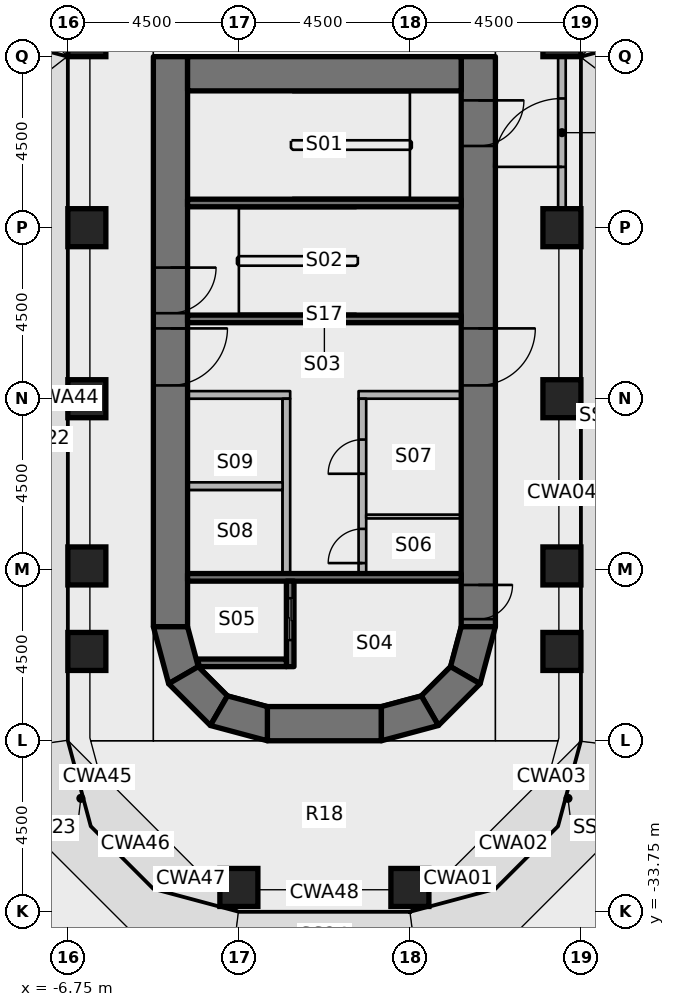
"""IFC4 building model, lengths in metres.
Left out: names, types, materials, properties, quantities, classifications, styles, units other than length and angle.
Written with IfcOpenShell. Run it as: python <this file> out.ifc"""

import sys

from ifc_helpers import new_model, si_unit, direction, frame, frame_2d, origin, origin_2d, place, context, subcontext, project, spatial, polyline, rectangle, outline, extrude, element, fill, save


model = new_model("IFC4")
c1 = context("Model", 3, precision=1e-05, world=origin(), true_north=direction((0.0, 1.0)))
c2 = subcontext(c1, "Body", "Model", "MODEL_VIEW")
j1 = project(units=[si_unit("LENGTHUNIT", "METRE"), si_unit("PLANEANGLEUNIT", "RADIAN")], contexts=[c1])
p1 = place(None, origin())
s1 = spatial("IfcSite", under=j1, at=p1, CompositionType="ELEMENT")
p2 = place(p1, origin())
s2 = spatial("IfcBuilding", under=s1, at=p2, CompositionType="ELEMENT")
p3 = place(p2, frame((0.0, 0.0, 27.0)))
s3 = spatial("IfcBuildingStorey", under=s2, at=p3, CompositionType="ELEMENT", Elevation=27.0)
for number, where, z_axis, x_axis in (
    (1, (-6.25, -26.9, 0.0), (0.0, 0.0, 1.0), (1.0, 0.0, 0.0)),
    (2, (-6.25, -24.65, 0.0), (0.0, 0.0, 1.0), (1.0, 0.0, 0.0)),
    (3, (-6.25, -20.25, 0.0), (0.0, 0.0, 1.0), (1.0, 0.0, 0.0)),
    (4, (-6.25, -15.75, 0.0), (0.0, 0.0, 1.0), (1.0, 0.0, 0.0)),
    (5, (-6.25, -10.75, 0.0), (0.0, 0.0, 1.0), (1.0, 0.0, 0.0)),
    (6, (-2.25, -33.11, 0.0), (0.0, 0.0, 1.0), (1.0, 0.0, 0.0)),
    (7, (2.25, -33.11, 0.0), (0.0, 0.0, 1.0), (1.0, 0.0, 0.0)),
    (8, (6.25, -26.9, 0.0), (0.0, 0.0, 1.0), (1.0, 0.0, 0.0)),
    (9, (6.25, -24.65, 0.0), (0.0, 0.0, 1.0), (1.0, 0.0, 0.0)),
    (10, (6.25, -20.25, 0.0), (0.0, 0.0, 1.0), (1.0, 0.0, 0.0)),
    (11, (6.25, -15.75, 0.0), (0.0, 0.0, 1.0), (1.0, 0.0, 0.0)),
    (12, (6.25, -10.75, 0.0), (0.0, 0.0, 1.0), (1.0, 0.0, 0.0)),
):
    element("IfcColumn", number, at=place(p3, frame(where, z_axis=z_axis, x_axis=x_axis)), inside=s3, PredefinedType="COLUMN", context=c2, shape_type="SweptSolid", body=[
        extrude(rectangle(XDim=1.0, YDim=1.0, at=origin_2d()), origin(), (0.0, 0.0, 1.0), 4.05),
    ])
p4 = place(p3, frame((-4.05, -11.25, 0.0), z_axis=(0.0, 0.0, 1.0), x_axis=(0.0, -1.0, 0.0)))
e13 = element("IfcWall", 13, at=p4, inside=s3, PredefinedType="SHEAR", context=c2, shape_type="SweptSolid", body=[
    extrude(rectangle(XDim=15.0, YDim=0.9, at=frame_2d((7.5, 0.0))), origin(), (0.0, 0.0, 1.0), 4.2),
])
p5 = place(p4, frame((7.15, 0.0, 0.0)))
e14 = element("IfcOpeningElement", 14, at=p5, cuts=e13, PredefinedType="OPENING", context=c2, shape_type="SweptSolid", body=[
    extrude(rectangle(XDim=1.5, YDim=2.3, at=frame_2d((0.75, 1.15))), frame((0.0, 0.46, 0.0), z_axis=(0.0, -1.0, 0.0), x_axis=(1.0, 0.0, 0.0)), (0.0, 0.0, 1.0), 0.92),
])
p6 = place(p4, frame((5.55, 0.0, 0.0)))
e15 = element("IfcOpeningElement", 15, at=p6, cuts=e13, PredefinedType="OPENING", context=c2, shape_type="SweptSolid", body=[
    extrude(rectangle(XDim=1.2, YDim=2.1, at=frame_2d((0.6, 1.05))), frame((0.0, 0.46, 0.0), z_axis=(0.0, -1.0, 0.0), x_axis=(1.0, 0.0, 0.0)), (0.0, 0.0, 1.0), 0.92),
])
p7 = place(p3, frame((4.05, -11.25, 0.0), z_axis=(0.0, 0.0, 1.0), x_axis=(0.0, -1.0, 0.0)))
e16 = element("IfcWall", 16, at=p7, inside=s3, PredefinedType="SHEAR", context=c2, shape_type="SweptSolid", body=[
    extrude(rectangle(XDim=15.0, YDim=0.9, at=frame_2d((7.5, 0.0))), origin(), (0.0, 0.0, 1.0), 4.2),
])
p8 = place(p7, frame((7.15, 0.0, 0.0)))
e17 = element("IfcOpeningElement", 17, at=p8, cuts=e16, PredefinedType="OPENING", context=c2, shape_type="SweptSolid", body=[
    extrude(rectangle(XDim=1.5, YDim=2.3, at=frame_2d((0.75, 1.15))), frame((0.0, 0.46, 0.0), z_axis=(0.0, -1.0, 0.0), x_axis=(1.0, 0.0, 0.0)), (0.0, 0.0, 1.0), 0.92),
])
p9 = place(p7, frame((13.9, 0.0, 0.0)))
e18 = element("IfcOpeningElement", 18, at=p9, cuts=e16, PredefinedType="OPENING", context=c2, shape_type="SweptSolid", body=[
    extrude(rectangle(XDim=0.9, YDim=2.1, at=frame_2d((0.45, 1.05))), frame((0.0, 0.46, 0.0), z_axis=(0.0, -1.0, 0.0), x_axis=(1.0, 0.0, 0.0)), (0.0, 0.0, 1.0), 0.92),
])
p10 = place(p7, frame((1.15, 0.0, 0.0)))
e19 = element("IfcOpeningElement", 19, at=p10, cuts=e16, PredefinedType="OPENING", context=c2, shape_type="SweptSolid", body=[
    extrude(rectangle(XDim=1.2, YDim=2.1, at=frame_2d((0.6, 1.05))), frame((0.0, 0.46, 0.0), z_axis=(0.0, -1.0, 0.0), x_axis=(1.0, 0.0, 0.0)), (0.0, 0.0, 1.0), 0.92),
])
p11 = place(p3, frame((-3.6, -11.7, 0.0), z_axis=(0.0, 0.0, 1.0), x_axis=(1.0, 0.0, 0.0)))
e20 = element("IfcWall", 20, at=p11, inside=s3, PredefinedType="SHEAR", context=c2, shape_type="SweptSolid", body=[
    extrude(rectangle(XDim=7.2, YDim=0.9, at=frame_2d((3.6, 0.0))), origin(), (0.0, 0.0, 1.0), 4.2),
])
p12 = place(p3, frame((-1.5, -28.8, 0.0), z_axis=(0.0, 0.0, 1.0), x_axis=(1.0, 0.0, 0.0)))
e21 = element("IfcWall", 21, at=p12, inside=s3, PredefinedType="SHEAR", context=c2, shape_type="SweptSolid", body=[
    extrude(rectangle(XDim=3.0, YDim=0.9, at=frame_2d((1.5, 0.0))), origin(), (0.0, 0.0, 1.0), 4.2),
])
p13 = place(p3, origin())
e22 = element("IfcWall", 22, at=p13, inside=s3, PredefinedType="SHEAR", context=c2, shape_type="SweptSolid", body=[
    extrude(outline(polyline([(-4.5, -26.25), (-4.098, -27.75), (-3.319, -27.3), (-3.6, -26.25), (-4.5, -26.25)])), origin(), (0.0, 0.0, 1.0), 4.2),
])
p14 = place(p3, origin())
e23 = element("IfcWall", 23, at=p14, inside=s3, PredefinedType="SHEAR", context=c2, shape_type="SweptSolid", body=[
    extrude(outline(polyline([(-4.098, -27.75), (-3.0, -28.848), (-2.55, -28.069), (-3.319, -27.3), (-4.098, -27.75)])), origin(), (0.0, 0.0, 1.0), 4.2),
])
p15 = place(p3, origin())
e24 = element("IfcWall", 24, at=p15, inside=s3, PredefinedType="SHEAR", context=c2, shape_type="SweptSolid", body=[
    extrude(outline(polyline([(-3.0, -28.848), (-1.5, -29.25), (-1.5, -28.35), (-2.55, -28.069), (-3.0, -28.848)])), origin(), (0.0, 0.0, 1.0), 4.2),
])
p16 = place(p3, origin())
e25 = element("IfcWall", 25, at=p16, inside=s3, PredefinedType="SHEAR", context=c2, shape_type="SweptSolid", body=[
    extrude(outline(polyline([(4.5, -26.25), (4.098, -27.75), (3.319, -27.3), (3.6, -26.25), (4.5, -26.25)])), origin(), (0.0, 0.0, 1.0), 4.2),
])
p17 = place(p3, origin())
e26 = element("IfcWall", 26, at=p17, inside=s3, PredefinedType="SHEAR", context=c2, shape_type="SweptSolid", body=[
    extrude(outline(polyline([(4.098, -27.75), (3.0, -28.848), (2.55, -28.069), (3.319, -27.3), (4.098, -27.75)])), origin(), (0.0, 0.0, 1.0), 4.2),
])
p18 = place(p3, origin())
e27 = element("IfcWall", 27, at=p18, inside=s3, PredefinedType="SHEAR", context=c2, shape_type="SweptSolid", body=[
    extrude(outline(polyline([(3.0, -28.848), (1.5, -29.25), (1.5, -28.35), (2.55, -28.069), (3.0, -28.848)])), origin(), (0.0, 0.0, 1.0), 4.2),
])
p19 = place(p3, frame((6.25, -15.25, 0.0), z_axis=(0.0, 0.0, 1.0), x_axis=(0.0, 1.0, 0.0)))
e28 = element("IfcWall", 28, at=p19, inside=s3, PredefinedType="SOLIDWALL", context=c2, shape_type="SweptSolid", body=[
    extrude(rectangle(XDim=4.0, YDim=0.2, at=frame_2d((2.0, 0.0))), origin(), (0.0, 0.0, 1.0), 3.15),
])
p20 = place(p19, frame((1.1, 0.0, 0.0)))
e29 = element("IfcOpeningElement", 29, at=p20, cuts=e28, PredefinedType="OPENING", context=c2, shape_type="SweptSolid", body=[
    extrude(rectangle(XDim=1.8, YDim=2.4, at=frame_2d((0.9, 1.2))), frame((0.0, 0.11, 0.0), z_axis=(0.0, -1.0, 0.0), x_axis=(1.0, 0.0, 0.0)), (0.0, 0.0, 1.0), 0.22),
])
p21 = place(p3, frame((3.6, -24.95, 0.0), z_axis=(0.0, 0.0, 1.0), x_axis=(-1.0, 0.0, 0.0)))
e30 = element("IfcWall", 30, at=p21, inside=s3, PredefinedType="SHEAR", context=c2, shape_type="SweptSolid", body=[
    extrude(rectangle(XDim=7.2, YDim=0.2, at=frame_2d((3.6, 0.0))), origin(), (0.0, 0.0, 1.0), 4.05),
])
p22 = place(p3, frame((-0.9, -27.3, 0.0), z_axis=(0.0, 0.0, 1.0), x_axis=(0.0, 1.0, 0.0)))
e31 = element("IfcWall", 31, at=p22, inside=s3, PredefinedType="SHEAR", context=c2, shape_type="SweptSolid", body=[
    extrude(rectangle(XDim=2.25, YDim=0.2, at=frame_2d((1.125, 0.0))), origin(), (0.0, 0.0, 1.0), 4.05),
])
p23 = place(p22, frame((0.7, 0.0, 0.0)))
e32 = element("IfcOpeningElement", 32, at=p23, cuts=e31, PredefinedType="OPENING", context=c2, shape_type="SweptSolid", body=[
    extrude(rectangle(XDim=1.1, YDim=2.3, at=frame_2d((0.55, 1.15))), frame((0.0, 0.11, 0.0), z_axis=(0.0, -1.0, 0.0), x_axis=(1.0, 0.0, 0.0)), (0.0, 0.0, 1.0), 0.22),
])
p24 = place(p3, origin())
e33 = element("IfcWall", 33, at=p24, inside=s3, PredefinedType="SHEAR", context=c2, shape_type="SweptSolid", body=[
    extrude(outline(polyline([(-1.0, -27.1), (-3.341, -27.1), (-3.291, -27.284), (-3.275, -27.3), (-1.0, -27.3), (-1.0, -27.1)])), origin(), (0.0, 0.0, 1.0), 4.05),
])
for number, where, z_axis, x_axis in (
    (34, (3.6, -18.15, 0.0), (0.0, 0.0, 1.0), (-1.0, 0.0, 0.0)),
    (35, (3.6, -15.1, 0.0), (0.0, 0.0, 1.0), (-1.0, 0.0, 0.0)),
):
    element("IfcWall", number, at=place(p3, frame(where, z_axis=z_axis, x_axis=x_axis)), inside=s3, PredefinedType="SHEAR", context=c2, shape_type="SweptSolid", body=[
        extrude(rectangle(XDim=7.2, YDim=0.2, at=frame_2d((3.6, 0.0))), origin(), (0.0, 0.0, 1.0), 4.05),
    ])
p25 = place(p3, frame((3.6, -20.15, 0.0), z_axis=(0.0, 0.0, 1.0), x_axis=(-1.0, 0.0, 0.0)))
e36 = element("IfcWall", 36, at=p25, inside=s3, PredefinedType="PARTITIONING", context=c2, shape_type="SweptSolid", body=[
    extrude(rectangle(XDim=2.7, YDim=0.2, at=frame_2d((1.35, 0.0))), origin(), (0.0, 0.0, 1.0), 4.05),
])
p26 = place(p3, frame((1.0, -24.85, 0.0), z_axis=(0.0, 0.0, 1.0), x_axis=(0.0, 1.0, 0.0)))
e37 = element("IfcWall", 37, at=p26, inside=s3, PredefinedType="PARTITIONING", context=c2, shape_type="SweptSolid", body=[
    extrude(rectangle(XDim=4.6, YDim=0.2, at=frame_2d((2.3, 0.0))), origin(), (0.0, 0.0, 1.0), 4.05),
])
p27 = place(p26, frame((0.275, 0.0, 0.0)))
e38 = element("IfcOpeningElement", 38, at=p27, cuts=e37, PredefinedType="OPENING", context=c2, shape_type="SweptSolid", body=[
    extrude(rectangle(XDim=0.9, YDim=2.1, at=frame_2d((0.45, 1.05))), frame((0.0, 0.11, 0.0), z_axis=(0.0, -1.0, 0.0), x_axis=(1.0, 0.0, 0.0)), (0.0, 0.0, 1.0), 0.22),
])
p28 = place(p26, frame((2.625, 0.0, 0.0)))
e39 = element("IfcOpeningElement", 39, at=p28, cuts=e37, PredefinedType="OPENING", context=c2, shape_type="SweptSolid", body=[
    extrude(rectangle(XDim=0.9, YDim=2.1, at=frame_2d((0.45, 1.05))), frame((0.0, 0.11, 0.0), z_axis=(0.0, -1.0, 0.0), x_axis=(1.0, 0.0, 0.0)), (0.0, 0.0, 1.0), 0.22),
])
p29 = place(p3, frame((-0.9, -20.15, 0.0), z_axis=(0.0, 0.0, 1.0), x_axis=(-1.0, 0.0, 0.0)))
e40 = element("IfcWall", 40, at=p29, inside=s3, PredefinedType="PARTITIONING", context=c2, shape_type="SweptSolid", body=[
    extrude(rectangle(XDim=2.7, YDim=0.2, at=frame_2d((1.35, 0.0))), origin(), (0.0, 0.0, 1.0), 4.05),
])
p30 = place(p3, frame((-1.0, -24.85, 0.0), z_axis=(0.0, 0.0, 1.0), x_axis=(0.0, 1.0, 0.0)))
e41 = element("IfcWall", 41, at=p30, inside=s3, PredefinedType="PARTITIONING", context=c2, shape_type="SweptSolid", body=[
    extrude(rectangle(XDim=4.6, YDim=0.2, at=frame_2d((2.3, 0.0))), origin(), (0.0, 0.0, 1.0), 4.05),
])
p31 = place(p3, frame((3.6, -23.35, 0.0), z_axis=(0.0, 0.0, 1.0), x_axis=(-1.0, 0.0, 0.0)))
e42 = element("IfcWall", 42, at=p31, inside=s3, PredefinedType="PARTITIONING", context=c2, shape_type="SweptSolid", body=[
    extrude(rectangle(XDim=2.5, YDim=0.1, at=frame_2d((1.25, 0.0))), origin(), (0.0, 0.0, 1.0), 4.05),
])
p32 = place(p3, frame((-1.1, -22.55, 0.0), z_axis=(0.0, 0.0, 1.0), x_axis=(-1.0, 0.0, 0.0)))
e43 = element("IfcWall", 43, at=p32, inside=s3, PredefinedType="PARTITIONING", context=c2, shape_type="SweptSolid", body=[
    extrude(rectangle(XDim=2.5, YDim=0.2, at=frame_2d((1.25, 0.0))), origin(), (0.0, 0.0, 1.0), 4.05),
])
p33 = place(p20, origin())
e44 = element("IfcDoor", 44, at=p33, inside=s3, OperationType="SINGLE_SWING_LEFT", PredefinedType="DOOR", context=c2, shape_type="SweptSolid", body=[
    extrude(rectangle(XDim=1.8, YDim=2.4, at=frame_2d((0.9, 1.2))), frame((0.0, 0.025, 0.0), z_axis=(0.0, -1.0, 0.0), x_axis=(1.0, 0.0, 0.0)), (0.0, 0.0, 1.0), 0.05),
])
fill(e29, e44)
p34 = place(p8, origin())
e45 = element("IfcDoor", 45, at=p34, inside=s3, OperationType="DOUBLE_DOOR_SINGLE_SWING", PredefinedType="DOOR", context=c2, shape_type="SweptSolid", body=[
    extrude(rectangle(XDim=1.5, YDim=2.3, at=frame_2d((0.75, 1.15))), frame((0.0, 0.025, 0.0), z_axis=(0.0, -1.0, 0.0), x_axis=(1.0, 0.0, 0.0)), (0.0, 0.0, 1.0), 0.05),
])
fill(e17, e45)
p35 = place(p5, origin())
e46 = element("IfcDoor", 46, at=p35, inside=s3, OperationType="DOUBLE_DOOR_SINGLE_SWING", PredefinedType="DOOR", context=c2, shape_type="SweptSolid", body=[
    extrude(rectangle(XDim=1.5, YDim=2.3, at=frame_2d((0.75, 1.15))), frame((0.0, 0.025, 0.0), z_axis=(0.0, -1.0, 0.0), x_axis=(1.0, 0.0, 0.0)), (0.0, 0.0, 1.0), 0.05),
])
fill(e14, e46)
p36 = place(p9, origin())
e47 = element("IfcDoor", 47, at=p36, inside=s3, OperationType="SINGLE_SWING_LEFT", PredefinedType="DOOR", context=c2, shape_type="SweptSolid", body=[
    extrude(rectangle(XDim=0.9, YDim=2.1, at=frame_2d((0.45, 1.05))), frame((0.0, 0.025, 0.0), z_axis=(0.0, -1.0, 0.0), x_axis=(1.0, 0.0, 0.0)), (0.0, 0.0, 1.0), 0.05),
])
fill(e18, e47)
p37 = place(p6, origin())
e48 = element("IfcDoor", 48, at=p37, inside=s3, OperationType="SINGLE_SWING_RIGHT", PredefinedType="DOOR", context=c2, shape_type="SweptSolid", body=[
    extrude(rectangle(XDim=1.2, YDim=2.1, at=frame_2d((0.6, 1.05))), frame((0.0, 0.025, 0.0), z_axis=(0.0, -1.0, 0.0), x_axis=(1.0, 0.0, 0.0)), (0.0, 0.0, 1.0), 0.05),
])
fill(e15, e48)
p38 = place(p10, origin())
e49 = element("IfcDoor", 49, at=p38, inside=s3, OperationType="SINGLE_SWING_LEFT", PredefinedType="DOOR", context=c2, shape_type="SweptSolid", body=[
    extrude(rectangle(XDim=1.2, YDim=2.1, at=frame_2d((0.6, 1.05))), frame((0.0, 0.025, 0.0), z_axis=(0.0, -1.0, 0.0), x_axis=(1.0, 0.0, 0.0)), (0.0, 0.0, 1.0), 0.05),
])
fill(e19, e49)
p39 = place(p23, origin())
e50 = element("IfcDoor", 50, at=p39, inside=s3, OperationType="DOUBLE_DOOR_SLIDING", PredefinedType="DOOR", context=c2, shape_type="SweptSolid", body=[
    extrude(rectangle(XDim=1.1, YDim=2.3, at=frame_2d((0.55, 1.15))), frame((0.0, 0.025, 0.0), z_axis=(0.0, -1.0, 0.0), x_axis=(1.0, 0.0, 0.0)), (0.0, 0.0, 1.0), 0.05),
])
fill(e32, e50)
p40 = place(p27, origin())
e51 = element("IfcDoor", 51, at=p40, inside=s3, OperationType="SINGLE_SWING_LEFT", PredefinedType="DOOR", context=c2, shape_type="SweptSolid", body=[
    extrude(rectangle(XDim=0.9, YDim=2.1, at=frame_2d((0.45, 1.05))), frame((0.0, 0.025, 0.0), z_axis=(0.0, -1.0, 0.0), x_axis=(1.0, 0.0, 0.0)), (0.0, 0.0, 1.0), 0.05),
])
fill(e38, e51)
p41 = place(p28, origin())
e52 = element("IfcDoor", 52, at=p41, inside=s3, OperationType="SINGLE_SWING_LEFT", PredefinedType="DOOR", context=c2, shape_type="SweptSolid", body=[
    extrude(rectangle(XDim=0.9, YDim=2.1, at=frame_2d((0.45, 1.05))), frame((0.0, 0.025, 0.0), z_axis=(0.0, -1.0, 0.0), x_axis=(1.0, 0.0, 0.0)), (0.0, 0.0, 1.0), 0.05),
])
fill(e39, e52)
save(model, sys.argv[1])
